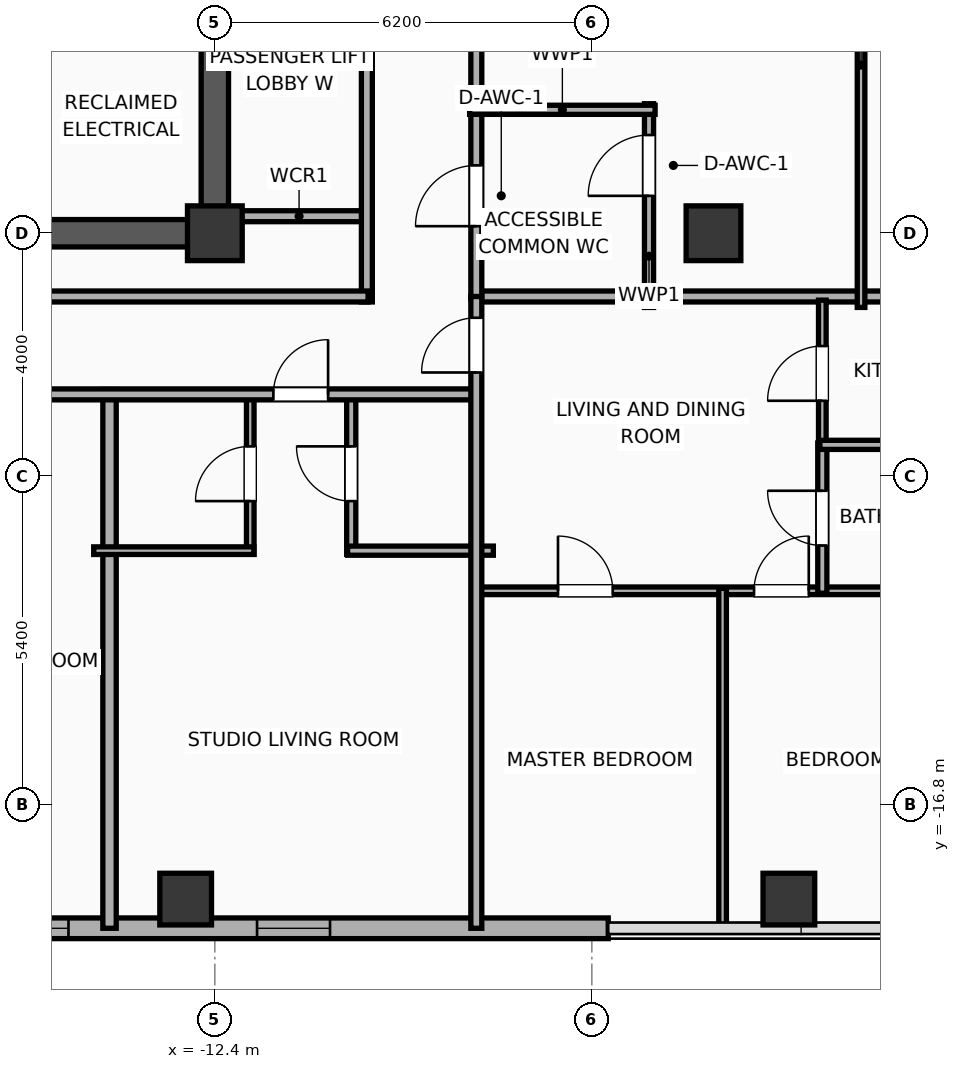
"""IFC4 building model, lengths in metres.
Left out: names, types, materials, properties, quantities, classifications, styles, units other than length and angle.
Written with IfcOpenShell. Run it as: python <this file> out.ifc"""

import sys

from ifc_helpers import new_model, si_unit, direction, frame, frame_2d, origin, origin_2d, place, context, subcontext, project, spatial, rectangle, hollow_rectangle, extrude, element, fill, save


model = new_model("IFC4")
c1 = context("Model", 3, precision=1e-05, world=origin(), true_north=direction((0.0, 1.0)))
c2 = subcontext(c1, "Body", "Model", "MODEL_VIEW")
j1 = project(units=[si_unit("LENGTHUNIT", "METRE"), si_unit("PLANEANGLEUNIT", "RADIAN")], contexts=[c1])
p1 = place(None, origin())
s1 = spatial("IfcSite", under=j1, at=p1, CompositionType="ELEMENT")
p2 = place(p1, origin())
s2 = spatial("IfcBuilding", under=s1, at=p2, CompositionType="ELEMENT")
p3 = place(p2, frame((0.0, 0.0, 211.9)))
s3 = spatial("IfcBuildingStorey", under=s2, at=p3, CompositionType="ELEMENT", Elevation=211.9)
p4 = place(p3, frame((-12.4, -7.4, 0.0), z_axis=(0.0, 0.0, 1.0), x_axis=(1.0, 0.0, 0.0)))
e1 = element("IfcColumn", 1, at=p4, inside=s3, PredefinedType="COLUMN", context=c2, shape_type="SweptSolid", body=[
    extrude(rectangle(XDim=0.9, YDim=0.9, at=origin_2d()), origin(), (0.0, 0.0, 1.0), 3.9),
])
p5 = place(p3, frame((-19.425, -7.4, 0.0), z_axis=(0.0, 0.0, 1.0), x_axis=(1.0, 0.0, 0.0)))
e2 = element("IfcWall", 2, at=p5, inside=s3, PredefinedType="SHEAR", context=c2, shape_type="SweptSolid", body=[
    extrude(rectangle(XDim=7.25, YDim=0.45, at=frame_2d((3.625, 0.0))), origin(), (0.0, 0.0, 1.0), 3.65),
])
p6 = place(p3, frame((-12.4, -7.4, 0.0), z_axis=(0.0, 0.0, 1.0), x_axis=(0.0, 1.0, 0.0)))
e3 = element("IfcWall", 3, at=p6, inside=s3, PredefinedType="SHEAR", context=c2, shape_type="SweptSolid", body=[
    extrude(rectangle(XDim=14.8, YDim=0.45, at=frame_2d((7.4, 0.0))), origin(), (0.0, 0.0, 1.0), 3.65),
])
p7 = place(p6, frame((8.6, 0.0, 0.0)))
e4 = element("IfcOpeningElement", 4, at=p7, cuts=e3, PredefinedType="OPENING", context=c2, shape_type="SweptSolid", body=[
    extrude(rectangle(XDim=1.1, YDim=2.05, at=frame_2d((0.55, 1.025))), frame((0.0, 0.235, 0.0), z_axis=(0.0, -1.0, 0.0), x_axis=(1.0, 0.0, 0.0)), (0.0, 0.0, 1.0), 0.47),
])
p8 = place(p6, frame((10.53, 0.0, 0.0)))
e5 = element("IfcOpeningElement", 5, at=p8, cuts=e3, PredefinedType="OPENING", context=c2, shape_type="SweptSolid", body=[
    extrude(rectangle(XDim=1.1, YDim=2.05, at=frame_2d((0.55, 1.025))), frame((0.0, 0.235, 0.0), z_axis=(0.0, -1.0, 0.0), x_axis=(1.0, 0.0, 0.0)), (0.0, 0.0, 1.0), 0.47),
])
p9 = place(p6, frame((3.55, 0.0, 0.0)))
e6 = element("IfcOpeningElement", 6, at=p9, cuts=e3, PredefinedType="OPENING", context=c2, shape_type="SweptSolid", body=[
    extrude(rectangle(XDim=0.9, YDim=2.05, at=frame_2d((0.45, 1.025))), frame((0.0, 0.235, 0.0), z_axis=(0.0, -1.0, 0.0), x_axis=(1.0, 0.0, 0.0)), (0.0, 0.0, 1.0), 0.47),
])
p10 = place(p3, frame((-4.2, -7.4, 0.0), z_axis=(0.0, 0.0, 1.0), x_axis=(1.0, 0.0, 0.0)))
e7 = element("IfcColumn", 7, at=p10, inside=s3, PredefinedType="COLUMN", context=c2, shape_type="SweptSolid", body=[
    extrude(rectangle(XDim=0.9, YDim=0.9, at=origin_2d()), origin(), (0.0, 0.0, 1.0), 3.9),
])
for number, where, z_axis, x_axis in (
    (8, (-12.88, -18.35, 0.0), (0.0, 0.0, 1.0), (1.0, 0.0, 0.0)),
    (9, (-2.96, -18.35, 0.0), (0.0, 0.0, 1.0), (1.0, 0.0, 0.0)),
):
    element("IfcColumn", number, at=place(p3, frame(where, z_axis=z_axis, x_axis=x_axis)), inside=s3, PredefinedType="COLUMN", context=c2, shape_type="SweptSolid", body=[
        extrude(hollow_rectangle(XDim=0.85, YDim=0.85, WallThickness=0.028, at=origin_2d()), origin(), (0.0, 0.0, 1.0), 3.9),
    ])
p11 = place(p3, frame((-5.931, -18.83, 0.0), z_axis=(0.0, 0.0, 1.0), x_axis=(-1.0, 0.0, 0.0)))
e10 = element("IfcWall", 10, at=p11, inside=s3, PredefinedType="ELEMENTEDWALL", context=c2, shape_type="SweptSolid", body=[
    extrude(rectangle(XDim=16.853, YDim=0.34, at=frame_2d((8.426, 0.0))), origin(), (0.0, 0.0, 1.0), 3.65),
])
p12 = place(p11, frame((8.876, 0.0, 0.75)))
e11 = element("IfcOpeningElement", 11, at=p12, cuts=e10, PredefinedType="OPENING", context=c2, shape_type="SweptSolid", body=[
    extrude(rectangle(XDim=2.4, YDim=2.1, at=frame_2d((1.2, 1.05))), frame((0.0, 0.18, 0.0), z_axis=(0.0, -1.0, 0.0), x_axis=(1.0, 0.0, 0.0)), (0.0, 0.0, 1.0), 0.36),
])
p13 = place(p11, frame((14.509, 0.0, 0.75)))
e12 = element("IfcOpeningElement", 12, at=p13, cuts=e10, PredefinedType="OPENING", context=c2, shape_type="SweptSolid", body=[
    extrude(rectangle(XDim=1.2, YDim=2.05, at=frame_2d((0.6, 1.025))), frame((0.0, 0.18, 0.0), z_axis=(0.0, -1.0, 0.0), x_axis=(1.0, 0.0, 0.0)), (0.0, 0.0, 1.0), 0.36),
])
p14 = place(p11, frame((12.549, 0.0, 0.75)))
e13 = element("IfcOpeningElement", 13, at=p14, cuts=e10, PredefinedType="OPENING", context=c2, shape_type="SweptSolid", body=[
    extrude(rectangle(XDim=1.2, YDim=2.05, at=frame_2d((0.6, 1.025))), frame((0.0, 0.18, 0.0), z_axis=(0.0, -1.0, 0.0), x_axis=(1.0, 0.0, 0.0)), (0.0, 0.0, 1.0), 0.36),
])
p15 = place(p11, frame((4.575, 0.0, 0.75)))
e14 = element("IfcOpeningElement", 14, at=p15, cuts=e10, PredefinedType="OPENING", context=c2, shape_type="SweptSolid", body=[
    extrude(rectangle(XDim=1.2, YDim=2.05, at=frame_2d((0.6, 1.025))), frame((0.0, 0.18, 0.0), z_axis=(0.0, -1.0, 0.0), x_axis=(1.0, 0.0, 0.0)), (0.0, 0.0, 1.0), 0.36),
])
p16 = place(p3, frame((-12.15, -7.12, 0.0), z_axis=(0.0, 0.0, 1.0), x_axis=(1.0, 0.0, 0.0)))
e15 = element("IfcWall", 15, at=p16, inside=s3, PredefinedType="PARTITIONING", context=c2, shape_type="SweptSolid", body=[
    extrude(rectangle(XDim=2.27, YDim=0.18, at=frame_2d((1.135, 0.0))), origin(), (0.0, 0.0, 1.0), 3.65),
])
p17 = place(p3, frame((-9.9, -8.53, 0.0), z_axis=(0.0, 0.0, 1.0), x_axis=(0.0, 1.0, 0.0)))
e16 = element("IfcWall", 16, at=p17, inside=s3, PredefinedType="PARTITIONING", context=c2, shape_type="SweptSolid", body=[
    extrude(rectangle(XDim=17.06, YDim=0.18, at=frame_2d((8.53, 0.0))), origin(), (0.0, 0.0, 1.0), 3.65),
])
p18 = place(p17, frame((7.127, 0.0, 0.0)))
e17 = element("IfcOpeningElement", 17, at=p18, cuts=e16, PredefinedType="OPENING", context=c2, shape_type="SweptSolid", body=[
    extrude(rectangle(XDim=1.1, YDim=2.05, at=frame_2d((0.55, 1.025))), frame((0.0, 0.1, 0.0), z_axis=(0.0, -1.0, 0.0), x_axis=(1.0, 0.0, 0.0)), (0.0, 0.0, 1.0), 0.2),
])
p19 = place(p3, frame((-26.23, -8.44, 0.0), z_axis=(0.0, 0.0, 1.0), x_axis=(1.0, 0.0, 0.0)))
e18 = element("IfcWall", 18, at=p19, inside=s3, PredefinedType="PARTITIONING", context=c2, shape_type="SweptSolid", body=[
    extrude(rectangle(XDim=16.35, YDim=0.18, at=frame_2d((8.175, 0.0))), origin(), (0.0, 0.0, 1.0), 3.65),
])
p20 = place(p3, frame((-8.15, -8.44, 0.0), z_axis=(0.0, 0.0, 1.0), x_axis=(1.0, 0.0, 0.0)))
e19 = element("IfcWall", 19, at=p20, inside=s3, PredefinedType="PARTITIONING", context=c2, shape_type="SweptSolid", body=[
    extrude(rectangle(XDim=16.3, YDim=0.18, at=frame_2d((8.15, 0.0))), origin(), (0.0, 0.0, 1.0), 3.65),
])
p21 = place(p3, frame((-8.1, -8.48, 0.0), z_axis=(0.0, 0.0, 1.0), x_axis=(0.0, 1.0, 0.0)))
e20 = element("IfcWall", 20, at=p21, inside=s3, PredefinedType="PARTITIONING", context=c2, shape_type="SweptSolid", body=[
    extrude(rectangle(XDim=16.96, YDim=0.18, at=frame_2d((8.48, 0.0))), origin(), (0.0, 0.0, 1.0), 3.65),
])
p22 = place(p21, frame((1.196, 0.0, 0.0)))
e21 = element("IfcOpeningElement", 21, at=p22, cuts=e20, PredefinedType="OPENING", context=c2, shape_type="SweptSolid", body=[
    extrude(rectangle(XDim=1.0, YDim=2.05, at=frame_2d((0.5, 1.025))), frame((0.0, 0.1, 0.0), z_axis=(0.0, -1.0, 0.0), x_axis=(1.0, 0.0, 0.0)), (0.0, 0.0, 1.0), 0.2),
])
p23 = place(p21, frame((9.701, 0.0, 0.0)))
e22 = element("IfcOpeningElement", 22, at=p23, cuts=e20, PredefinedType="OPENING", context=c2, shape_type="SweptSolid", body=[
    extrude(rectangle(XDim=0.95, YDim=2.05, at=frame_2d((0.475, 1.025))), frame((0.0, 0.1, 0.0), z_axis=(0.0, -1.0, 0.0), x_axis=(1.0, 0.0, 0.0)), (0.0, 0.0, 1.0), 0.2),
])
p24 = place(p3, frame((-5.26, -8.62, 0.0), z_axis=(0.0, 0.0, 1.0), x_axis=(0.0, 1.0, 0.0)))
e23 = element("IfcWall", 23, at=p24, inside=s3, PredefinedType="PLUMBINGWALL", context=c2, shape_type="SweptSolid", body=[
    extrude(rectangle(XDim=3.35, YDim=0.15, at=frame_2d((1.675, 0.0))), origin(), (0.0, 0.0, 1.0), 3.65),
])
p25 = place(p24, frame((1.835, 0.0, 0.0)))
e24 = element("IfcOpeningElement", 24, at=p25, cuts=e23, PredefinedType="OPENING", context=c2, shape_type="SweptSolid", body=[
    extrude(rectangle(XDim=1.0, YDim=2.05, at=frame_2d((0.5, 1.025))), frame((0.0, 0.085, 0.0), z_axis=(0.0, -1.0, 0.0), x_axis=(1.0, 0.0, 0.0)), (0.0, 0.0, 1.0), 0.17),
])
p26 = place(p3, frame((-8.21, -5.37, 0.0), z_axis=(0.0, 0.0, 1.0), x_axis=(1.0, 0.0, 0.0)))
e25 = element("IfcWall", 25, at=p26, inside=s3, PredefinedType="PLUMBINGWALL", context=c2, shape_type="SweptSolid", body=[
    extrude(rectangle(XDim=3.05, YDim=0.15, at=frame_2d((1.525, 0.0))), origin(), (0.0, 0.0, 1.0), 3.65),
])
p27 = place(p3, frame((-1.773, -8.62, 0.0), z_axis=(0.0, 0.0, 1.0), x_axis=(0.0, 1.0, 0.0)))
e26 = element("IfcWall", 26, at=p27, inside=s3, PredefinedType="PARTITIONING", context=c2, shape_type="SweptSolid", body=[
    extrude(rectangle(XDim=17.19, YDim=0.125, at=frame_2d((8.595, 0.0))), origin(), (0.0, 0.0, 1.0), 3.65),
])
p28 = place(p27, frame((8.12, 0.0, 0.0)))
e27 = element("IfcOpeningElement", 27, at=p28, cuts=e26, PredefinedType="OPENING", context=c2, shape_type="SweptSolid", body=[
    extrude(rectangle(XDim=0.95, YDim=2.05, at=frame_2d((0.475, 1.025))), frame((0.0, 0.073, 0.0), z_axis=(0.0, -1.0, 0.0), x_axis=(1.0, 0.0, 0.0)), (0.0, 0.0, 1.0), 0.145),
])
p29 = place(p3, frame((-14.132, -18.83, 0.0), z_axis=(0.0, 0.0, 1.0), x_axis=(0.0, 1.0, 0.0)))
e28 = element("IfcWall", 28, at=p29, inside=s3, PredefinedType="PARTITIONING", context=c2, shape_type="SweptSolid", body=[
    extrude(rectangle(XDim=8.86, YDim=0.22, at=frame_2d((4.43, 0.0))), origin(), (0.0, 0.0, 1.0), 3.65),
])
p30 = place(p3, frame((-11.818, -12.68, 0.0), z_axis=(0.0, 0.0, 1.0), x_axis=(0.0, 1.0, 0.0)))
e29 = element("IfcWall", 29, at=p30, inside=s3, PredefinedType="PARTITIONING", context=c2, shape_type="SweptSolid", body=[
    extrude(rectangle(XDim=2.65, YDim=0.125, at=frame_2d((1.325, 0.0))), origin(), (0.0, 0.0, 1.0), 3.65),
])
p31 = place(p30, frame((0.875, 0.0, 0.0)))
e30 = element("IfcOpeningElement", 30, at=p31, cuts=e29, PredefinedType="OPENING", context=c2, shape_type="SweptSolid", body=[
    extrude(rectangle(XDim=0.9, YDim=2.05, at=frame_2d((0.45, 1.025))), frame((0.0, 0.073, 0.0), z_axis=(0.0, -1.0, 0.0), x_axis=(1.0, 0.0, 0.0)), (0.0, 0.0, 1.0), 0.145),
])
p32 = place(p3, frame((-10.157, -12.68, 0.0), z_axis=(0.0, 0.0, 1.0), x_axis=(0.0, 1.0, 0.0)))
e31 = element("IfcWall", 31, at=p32, inside=s3, PredefinedType="PLUMBINGWALL", context=c2, shape_type="SweptSolid", body=[
    extrude(rectangle(XDim=2.65, YDim=0.15, at=frame_2d((1.325, 0.0))), origin(), (0.0, 0.0, 1.0), 3.65),
])
p33 = place(p32, frame((0.875, 0.0, 0.0)))
e32 = element("IfcOpeningElement", 32, at=p33, cuts=e31, PredefinedType="OPENING", context=c2, shape_type="SweptSolid", body=[
    extrude(rectangle(XDim=0.9, YDim=2.05, at=frame_2d((0.45, 1.025))), frame((0.0, 0.085, 0.0), z_axis=(0.0, -1.0, 0.0), x_axis=(1.0, 0.0, 0.0)), (0.0, 0.0, 1.0), 0.17),
])
p34 = place(p3, frame((-14.392, -12.62, 0.0), z_axis=(0.0, 0.0, 1.0), x_axis=(1.0, 0.0, 0.0)))
e33 = element("IfcWall", 33, at=p34, inside=s3, PredefinedType="PARTITIONING", context=c2, shape_type="SweptSolid", body=[
    extrude(rectangle(XDim=2.634, YDim=0.125, at=frame_2d((1.317, 0.0))), origin(), (0.0, 0.0, 1.0), 3.65),
])
p35 = place(p3, frame((-10.217, -12.62, 0.0), z_axis=(0.0, 0.0, 1.0), x_axis=(1.0, 0.0, 0.0)))
e34 = element("IfcWall", 34, at=p35, inside=s3, PredefinedType="PLUMBINGWALL", context=c2, shape_type="SweptSolid", body=[
    extrude(rectangle(XDim=2.397, YDim=0.15, at=frame_2d((1.198, 0.0))), origin(), (0.0, 0.0, 1.0), 3.65),
])
p36 = place(p3, frame((-26.23, -10.05, 0.0), z_axis=(0.0, 0.0, 1.0), x_axis=(1.0, 0.0, 0.0)))
e35 = element("IfcWall", 35, at=p36, inside=s3, PredefinedType="PARTITIONING", context=c2, shape_type="SweptSolid", body=[
    extrude(rectangle(XDim=18.15, YDim=0.18, at=frame_2d((9.075, 0.0))), origin(), (0.0, 0.0, 1.0), 3.65),
])
p37 = place(p36, frame((2.659, 0.0, 0.0)))
e36 = element("IfcOpeningElement", 36, at=p37, cuts=e35, PredefinedType="OPENING", context=c2, shape_type="SweptSolid", body=[
    extrude(rectangle(XDim=0.9, YDim=2.05, at=frame_2d((0.45, 1.025))), frame((0.0, 0.1, 0.0), z_axis=(0.0, -1.0, 0.0), x_axis=(1.0, 0.0, 0.0)), (0.0, 0.0, 1.0), 0.2),
])
p38 = place(p36, frame((9.571, 0.0, 0.0)))
e37 = element("IfcOpeningElement", 37, at=p38, cuts=e35, PredefinedType="OPENING", context=c2, shape_type="SweptSolid", body=[
    extrude(rectangle(XDim=1.15, YDim=2.05, at=frame_2d((0.575, 1.025))), frame((0.0, 0.1, 0.0), z_axis=(0.0, -1.0, 0.0), x_axis=(1.0, 0.0, 0.0)), (0.0, 0.0, 1.0), 0.2),
])
p39 = place(p36, frame((14.792, 0.0, 0.0)))
e38 = element("IfcOpeningElement", 38, at=p39, cuts=e35, PredefinedType="OPENING", context=c2, shape_type="SweptSolid", body=[
    extrude(rectangle(XDim=0.9, YDim=2.05, at=frame_2d((0.45, 1.025))), frame((0.0, 0.1, 0.0), z_axis=(0.0, -1.0, 0.0), x_axis=(1.0, 0.0, 0.0)), (0.0, 0.0, 1.0), 0.2),
])
p40 = place(p3, frame((-8.08, -13.28, 0.0), z_axis=(0.0, 0.0, 1.0), x_axis=(1.0, 0.0, 0.0)))
e39 = element("IfcWall", 39, at=p40, inside=s3, PredefinedType="PARTITIONING", context=c2, shape_type="SweptSolid", body=[
    extrude(rectangle(XDim=8.06, YDim=0.125, at=frame_2d((4.03, 0.0))), origin(), (0.0, 0.0, 1.0), 3.65),
])
p41 = place(p40, frame((1.323, 0.0, 0.0)))
e40 = element("IfcOpeningElement", 40, at=p41, cuts=e39, PredefinedType="OPENING", context=c2, shape_type="SweptSolid", body=[
    extrude(rectangle(XDim=0.9, YDim=2.05, at=frame_2d((0.45, 1.025))), frame((0.0, 0.073, 0.0), z_axis=(0.0, -1.0, 0.0), x_axis=(1.0, 0.0, 0.0)), (0.0, 0.0, 1.0), 0.145),
])
p42 = place(p40, frame((4.547, 0.0, 0.0)))
e41 = element("IfcOpeningElement", 41, at=p42, cuts=e39, PredefinedType="OPENING", context=c2, shape_type="SweptSolid", body=[
    extrude(rectangle(XDim=0.9, YDim=2.05, at=frame_2d((0.45, 1.025))), frame((0.0, 0.073, 0.0), z_axis=(0.0, -1.0, 0.0), x_axis=(1.0, 0.0, 0.0)), (0.0, 0.0, 1.0), 0.145),
])
p43 = place(p3, frame((-2.41, -10.91, 0.0), z_axis=(0.0, 0.0, 1.0), x_axis=(0.0, 1.0, 0.0)))
e42 = element("IfcWall", 42, at=p43, inside=s3, PredefinedType="PARTITIONING", context=c2, shape_type="SweptSolid", body=[
    extrude(rectangle(XDim=2.41, YDim=0.125, at=frame_2d((1.205, 0.0))), origin(), (0.0, 0.0, 1.0), 3.65),
])
p44 = place(p43, frame((0.755, 0.0, 0.0)))
e43 = element("IfcOpeningElement", 43, at=p44, cuts=e42, PredefinedType="OPENING", context=c2, shape_type="SweptSolid", body=[
    extrude(rectangle(XDim=0.9, YDim=2.05, at=frame_2d((0.45, 1.025))), frame((0.0, 0.073, 0.0), z_axis=(0.0, -1.0, 0.0), x_axis=(1.0, 0.0, 0.0)), (0.0, 0.0, 1.0), 0.145),
])
p45 = place(p3, frame((-2.41, -13.32, 0.0), z_axis=(0.0, 0.0, 1.0), x_axis=(0.0, 1.0, 0.0)))
e44 = element("IfcWall", 44, at=p45, inside=s3, PredefinedType="PLUMBINGWALL", context=c2, shape_type="SweptSolid", body=[
    extrude(rectangle(XDim=2.47, YDim=0.15, at=frame_2d((1.235, 0.0))), origin(), (0.0, 0.0, 1.0), 3.65),
])
p46 = place(p45, frame((0.785, 0.0, 0.0)))
e45 = element("IfcOpeningElement", 45, at=p46, cuts=e44, PredefinedType="OPENING", context=c2, shape_type="SweptSolid", body=[
    extrude(rectangle(XDim=0.9, YDim=2.05, at=frame_2d((0.45, 1.025))), frame((0.0, 0.085, 0.0), z_axis=(0.0, -1.0, 0.0), x_axis=(1.0, 0.0, 0.0)), (0.0, 0.0, 1.0), 0.17),
])
p47 = place(p3, frame((-2.45, -10.88, 0.0), z_axis=(0.0, 0.0, 1.0), x_axis=(1.0, 0.0, 0.0)))
e46 = element("IfcWall", 46, at=p47, inside=s3, PredefinedType="PLUMBINGWALL", context=c2, shape_type="SweptSolid", body=[
    extrude(rectangle(XDim=2.43, YDim=0.15, at=frame_2d((1.215, 0.0))), origin(), (0.0, 0.0, 1.0), 3.65),
])
p48 = place(p3, frame((-4.05, -18.83, 0.0), z_axis=(0.0, 0.0, 1.0), x_axis=(0.0, 1.0, 0.0)))
e47 = element("IfcWall", 47, at=p48, inside=s3, PredefinedType="PARTITIONING", context=c2, shape_type="SweptSolid", body=[
    extrude(rectangle(XDim=5.59, YDim=0.125, at=frame_2d((2.795, 0.0))), origin(), (0.0, 0.0, 1.0), 3.65),
])
p49 = place(p3, frame((-8.1, -18.83, 0.0), z_axis=(0.0, 0.0, 1.0), x_axis=(0.0, 1.0, 0.0)))
e48 = element("IfcWall", 48, at=p49, inside=s3, PredefinedType="PARTITIONING", context=c2, shape_type="SweptSolid", body=[
    extrude(rectangle(XDim=10.39, YDim=0.18, at=frame_2d((5.195, 0.0))), origin(), (0.0, 0.0, 1.0), 3.65),
])
p50 = place(p49, frame((9.14, 0.0, 0.0)))
e49 = element("IfcOpeningElement", 49, at=p50, cuts=e48, PredefinedType="OPENING", context=c2, shape_type="SweptSolid", body=[
    extrude(rectangle(XDim=0.9, YDim=2.05, at=frame_2d((0.45, 1.025))), frame((0.0, 0.1, 0.0), z_axis=(0.0, -1.0, 0.0), x_axis=(1.0, 0.0, 0.0)), (0.0, 0.0, 1.0), 0.2),
])
p51 = place(p12, origin())
e50 = element("IfcWindow", 50, at=p51, inside=s3, PartitioningType="SINGLE_PANEL", PredefinedType="WINDOW", context=c2, shape_type="SweptSolid", body=[
    extrude(rectangle(XDim=2.4, YDim=2.1, at=frame_2d((1.2, 1.05))), frame((0.0, 0.03, 0.0), z_axis=(0.0, -1.0, 0.0), x_axis=(1.0, 0.0, 0.0)), (0.0, 0.0, 1.0), 0.06),
])
fill(e11, e50)
p52 = place(p15, origin())
e51 = element("IfcWindow", 51, at=p52, inside=s3, PartitioningType="SINGLE_PANEL", PredefinedType="WINDOW", context=c2, shape_type="SweptSolid", body=[
    extrude(rectangle(XDim=1.2, YDim=2.05, at=frame_2d((0.6, 1.025))), frame((0.0, 0.03, 0.0), z_axis=(0.0, -1.0, 0.0), x_axis=(1.0, 0.0, 0.0)), (0.0, 0.0, 1.0), 0.06),
])
fill(e14, e51)
p53 = place(p22, origin())
e52 = element("IfcDoor", 52, at=p53, inside=s3, OperationType="SINGLE_SWING_LEFT", PredefinedType="DOOR", context=c2, shape_type="SweptSolid", body=[
    extrude(rectangle(XDim=1.0, YDim=2.05, at=frame_2d((0.5, 1.025))), frame((0.0, 0.025, 0.0), z_axis=(0.0, -1.0, 0.0), x_axis=(1.0, 0.0, 0.0)), (0.0, 0.0, 1.0), 0.05),
])
fill(e21, e52)
p54 = place(p25, origin())
e53 = element("IfcDoor", 53, at=p54, inside=s3, OperationType="SINGLE_SWING_LEFT", PredefinedType="DOOR", context=c2, shape_type="SweptSolid", body=[
    extrude(rectangle(XDim=1.0, YDim=2.05, at=frame_2d((0.5, 1.025))), frame((0.0, 0.025, 0.0), z_axis=(0.0, -1.0, 0.0), x_axis=(1.0, 0.0, 0.0)), (0.0, 0.0, 1.0), 0.05),
])
fill(e24, e53)
p55 = place(p31, origin())
e54 = element("IfcDoor", 54, at=p55, inside=s3, OperationType="SINGLE_SWING_LEFT", PredefinedType="DOOR", context=c2, shape_type="SweptSolid", body=[
    extrude(rectangle(XDim=0.9, YDim=2.05, at=frame_2d((0.45, 1.025))), frame((0.0, 0.025, 0.0), z_axis=(0.0, -1.0, 0.0), x_axis=(1.0, 0.0, 0.0)), (0.0, 0.0, 1.0), 0.05),
])
fill(e30, e54)
p56 = place(p33, origin())
e55 = element("IfcDoor", 55, at=p56, inside=s3, OperationType="SINGLE_SWING_RIGHT", PredefinedType="DOOR", context=c2, shape_type="SweptSolid", body=[
    extrude(rectangle(XDim=0.9, YDim=2.05, at=frame_2d((0.45, 1.025))), frame((0.0, 0.025, 0.0), z_axis=(0.0, -1.0, 0.0), x_axis=(1.0, 0.0, 0.0)), (0.0, 0.0, 1.0), 0.05),
])
fill(e32, e55)
p57 = place(p39, origin())
e56 = element("IfcDoor", 56, at=p57, inside=s3, OperationType="SINGLE_SWING_RIGHT", PredefinedType="DOOR", context=c2, shape_type="SweptSolid", body=[
    extrude(rectangle(XDim=0.9, YDim=2.05, at=frame_2d((0.45, 1.025))), frame((0.0, 0.025, 0.0), z_axis=(0.0, -1.0, 0.0), x_axis=(1.0, 0.0, 0.0)), (0.0, 0.0, 1.0), 0.05),
])
fill(e38, e56)
p58 = place(p41, origin())
e57 = element("IfcDoor", 57, at=p58, inside=s3, OperationType="SINGLE_SWING_LEFT", PredefinedType="DOOR", context=c2, shape_type="SweptSolid", body=[
    extrude(rectangle(XDim=0.9, YDim=2.05, at=frame_2d((0.45, 1.025))), frame((0.0, 0.025, 0.0), z_axis=(0.0, -1.0, 0.0), x_axis=(1.0, 0.0, 0.0)), (0.0, 0.0, 1.0), 0.05),
])
fill(e40, e57)
p59 = place(p42, origin())
e58 = element("IfcDoor", 58, at=p59, inside=s3, OperationType="SINGLE_SWING_RIGHT", PredefinedType="DOOR", context=c2, shape_type="SweptSolid", body=[
    extrude(rectangle(XDim=0.9, YDim=2.05, at=frame_2d((0.45, 1.025))), frame((0.0, 0.025, 0.0), z_axis=(0.0, -1.0, 0.0), x_axis=(1.0, 0.0, 0.0)), (0.0, 0.0, 1.0), 0.05),
])
fill(e41, e58)
p60 = place(p44, origin())
e59 = element("IfcDoor", 59, at=p60, inside=s3, OperationType="SINGLE_SWING_LEFT", PredefinedType="DOOR", context=c2, shape_type="SweptSolid", body=[
    extrude(rectangle(XDim=0.9, YDim=2.05, at=frame_2d((0.45, 1.025))), frame((0.0, 0.025, 0.0), z_axis=(0.0, -1.0, 0.0), x_axis=(1.0, 0.0, 0.0)), (0.0, 0.0, 1.0), 0.05),
])
fill(e43, e59)
p61 = place(p46, origin())
e60 = element("IfcDoor", 60, at=p61, inside=s3, OperationType="SINGLE_SWING_RIGHT", PredefinedType="DOOR", context=c2, shape_type="SweptSolid", body=[
    extrude(rectangle(XDim=0.9, YDim=2.05, at=frame_2d((0.45, 1.025))), frame((0.0, 0.025, 0.0), z_axis=(0.0, -1.0, 0.0), x_axis=(1.0, 0.0, 0.0)), (0.0, 0.0, 1.0), 0.05),
])
fill(e45, e60)
p62 = place(p50, origin())
e61 = element("IfcDoor", 61, at=p62, inside=s3, OperationType="SINGLE_SWING_LEFT", PredefinedType="DOOR", context=c2, shape_type="SweptSolid", body=[
    extrude(rectangle(XDim=0.9, YDim=2.05, at=frame_2d((0.45, 1.025))), frame((0.0, 0.025, 0.0), z_axis=(0.0, -1.0, 0.0), x_axis=(1.0, 0.0, 0.0)), (0.0, 0.0, 1.0), 0.05),
])
fill(e49, e61)
save(model, sys.argv[1])
